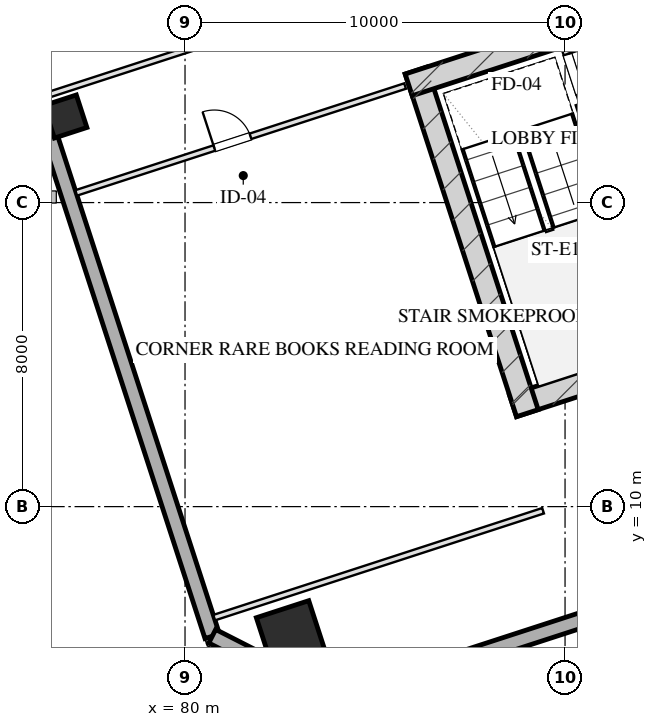
"""IFC4 building model, lengths in metres.
Left out: names, types, materials, properties, quantities, classifications, styles, units other than length and angle.
Written with IfcOpenShell. Run it as: python <this file> out.ifc"""

import sys

from ifc_helpers import new_model, si_unit, direction, frame, frame_2d, origin, origin_2d, place, context, subcontext, project, spatial, rectangle, hollow_rectangle, extrude, element, fill, save


model = new_model("IFC4")
c1 = context("Model", 3, precision=1e-05, world=origin(), true_north=direction((0.0, 1.0)))
c2 = subcontext(c1, "Body", "Model", "MODEL_VIEW")
j1 = project(units=[si_unit("LENGTHUNIT", "METRE"), si_unit("PLANEANGLEUNIT", "RADIAN")], contexts=[c1])
p1 = place(None, origin())
s1 = spatial("IfcSite", under=j1, at=p1, CompositionType="ELEMENT")
p2 = place(p1, origin())
s2 = spatial("IfcBuilding", under=s1, at=p2, CompositionType="ELEMENT")
p3 = place(p2, frame((0.0, 0.0, 100.05)))
s3 = spatial("IfcBuildingStorey", under=s2, at=p3, CompositionType="ELEMENT", Elevation=100.05)
p4 = place(p3, frame((88.63, 12.652, 0.0), z_axis=(0.0, 0.0, 1.0), x_axis=(0.95105714907, 0.309015046886, 0.0)))
e1 = element("IfcWall", 1, at=p4, inside=s3, PredefinedType="SHEAR", context=c2, shape_type="SweptSolid", body=[
    extrude(rectangle(XDim=16.4, YDim=0.6, at=frame_2d((8.2, 0.0))), origin(), (0.0, 0.0, 1.0), 3.45),
])
p5 = place(p3, frame((86.078, 21.475, 0.0), z_axis=(0.0, 0.0, 1.0), x_axis=(0.309017938678, -0.951056209472, 0.0)))
e2 = element("IfcWall", 2, at=p5, inside=s3, PredefinedType="SHEAR", context=c2, shape_type="SweptSolid", body=[
    extrude(rectangle(XDim=9.48, YDim=0.6, at=frame_2d((4.74, 0.0))), origin(), (0.0, 0.0, 1.0), 3.45),
])
p6 = place(p3, frame((85.886, 21.097, 0.0), z_axis=(0.0, 0.0, 1.0), x_axis=(0.951068073652, 0.308981422225, 0.0)))
e3 = element("IfcWall", 3, at=p6, inside=s3, PredefinedType="SHEAR", context=c2, shape_type="SweptSolid", body=[
    extrude(rectangle(XDim=4.22, YDim=0.6, at=frame_2d((2.11, 0.0))), origin(), (0.0, 0.0, 1.0), 3.45),
])
p7 = place(p3, frame((82.791, 6.612, 0.0), z_axis=(0.0, 0.0, 1.0), x_axis=(0.951056516295, 0.309016994375, 0.0)))
e4 = element("IfcColumn", 4, at=p7, inside=s3, PredefinedType="COLUMN", context=c2, shape_type="SweptSolid", body=[
    extrude(hollow_rectangle(XDim=1.45, YDim=1.45, WallThickness=0.05, at=origin_2d()), origin(), (0.0, 0.0, 1.0), 3.451),
])
p8 = place(p3, frame((76.851, 20.264, 0.0), z_axis=(0.0, 0.0, 1.0), x_axis=(0.951056516295, 0.309016994375, 0.0)))
e5 = element("IfcColumn", 5, at=p8, inside=s3, PredefinedType="COLUMN", context=c2, shape_type="SweptSolid", body=[
    extrude(hollow_rectangle(XDim=0.9, YDim=0.9, WallThickness=0.032, at=origin_2d()), origin(), (0.0, 0.0, 1.0), 3.451),
])
p9 = place(p3, frame((80.716, 6.59, 0.0), z_axis=(0.0, 0.0, 1.0), x_axis=(-0.309017542002, 0.95105633836, 0.0)))
e6 = element("IfcWall", 6, at=p9, inside=s3, PredefinedType="SOLIDWALL", context=c2, shape_type="SweptSolid", body=[
    extrude(rectangle(XDim=46.4, YDim=0.4, at=frame_2d((23.2, 0.0))), origin(), (0.0, 0.0, 1.0), 2.55),
])
p10 = place(p9, frame((15.6, 0.0, 0.75)))
e7 = element("IfcOpeningElement", 7, at=p10, cuts=e6, PredefinedType="OPENING", context=c2, shape_type="SweptSolid", body=[
    extrude(rectangle(XDim=2.4, YDim=1.4, at=frame_2d((1.2, 0.7))), frame((0.0, 0.21, 0.0), z_axis=(0.0, -1.0, 0.0), x_axis=(1.0, 0.0, 0.0)), (0.0, 0.0, 1.0), 0.42),
])
p11 = place(p9, frame((19.4, 0.0, 0.75)))
e8 = element("IfcOpeningElement", 8, at=p11, cuts=e6, PredefinedType="OPENING", context=c2, shape_type="SweptSolid", body=[
    extrude(rectangle(XDim=2.4, YDim=1.4, at=frame_2d((1.2, 0.7))), frame((0.0, 0.21, 0.0), z_axis=(0.0, -1.0, 0.0), x_axis=(1.0, 0.0, 0.0)), (0.0, 0.0, 1.0), 0.42),
])
p12 = place(p9, frame((25.496, 0.0, 0.0)))
e9 = element("IfcOpeningElement", 9, at=p12, cuts=e6, PredefinedType="OPENING", context=c2, shape_type="SweptSolid", body=[
    extrude(rectangle(XDim=1.1, YDim=2.15, at=frame_2d((0.55, 1.075))), frame((0.0, 0.21, 0.0), z_axis=(0.0, -1.0, 0.0), x_axis=(1.0, 0.0, 0.0)), (0.0, 0.0, 1.0), 0.42),
])
p13 = place(p3, frame((111.953, 14.005, 0.0), z_axis=(0.0, 0.0, 1.0), x_axis=(-0.95105505922, -0.309021478754, 0.0)))
e10 = element("IfcWall", 10, at=p13, inside=s3, PredefinedType="SOLIDWALL", context=c2, shape_type="SweptSolid", body=[
    extrude(rectangle(XDim=29.4, YDim=0.4, at=frame_2d((14.7, 0.0))), origin(), (0.0, 0.0, 1.0), 2.55),
])
p14 = place(p3, frame((83.992, 4.92, 0.0), z_axis=(0.0, 0.0, 1.0), x_axis=(-0.891001999643, 0.45399937955, 0.0)))
e11 = element("IfcWall", 11, at=p14, inside=s3, PredefinedType="SOLIDWALL", context=c2, shape_type="SweptSolid", body=[
    extrude(rectangle(XDim=3.677, YDim=0.4, at=frame_2d((1.839, 0.0))), origin(), (0.0, 0.0, 1.0), 2.55),
])
p15 = place(p3, frame((89.899, 22.401, 0.0), z_axis=(0.0, 0.0, 1.0), x_axis=(0.308932062672, -0.951084108086, 0.0)))
e12 = element("IfcWall", 12, at=p15, inside=s3, PredefinedType="PARTITIONING", context=c2, shape_type="SweptSolid", body=[
    extrude(rectangle(XDim=1.9, YDim=0.2, at=frame_2d((0.95, 0.0))), origin(), (0.0, 0.0, 1.0), 3.155),
])
p16 = place(p15, frame((0.52, 0.0, 0.0)))
e13 = element("IfcOpeningElement", 13, at=p16, cuts=e12, PredefinedType="OPENING", context=c2, shape_type="SweptSolid", body=[
    extrude(rectangle(XDim=1.1, YDim=2.05, at=frame_2d((0.55, 1.025))), frame((0.0, 0.11, 0.0), z_axis=(0.0, -1.0, 0.0), x_axis=(1.0, 0.0, 0.0)), (0.0, 0.0, 1.0), 0.22),
])
p17 = place(p3, frame((80.767, 7.079, 0.0), z_axis=(0.0, 0.0, 1.0), x_axis=(0.951057133767, 0.309015093986, 0.0)))
e14 = element("IfcWall", 14, at=p17, inside=s3, PredefinedType="PARTITIONING", context=c2, shape_type="SweptSolid", body=[
    extrude(rectangle(XDim=9.1, YDim=0.15, at=frame_2d((4.55, 0.0))), origin(), (0.0, 0.0, 1.0), 3.155),
])
p18 = place(p3, frame((77.136, 18.254, 0.0), z_axis=(0.0, 0.0, 1.0), x_axis=(0.951057133767, 0.309015093986, 0.0)))
e15 = element("IfcWall", 15, at=p18, inside=s3, PredefinedType="PARTITIONING", context=c2, shape_type="SweptSolid", body=[
    extrude(rectangle(XDim=9.1, YDim=0.15, at=frame_2d((4.55, 0.0))), origin(), (0.0, 0.0, 1.0), 3.155),
])
p19 = place(p18, frame((3.822, 0.0, 0.0)))
e16 = element("IfcOpeningElement", 16, at=p19, cuts=e15, PredefinedType="OPENING", context=c2, shape_type="SweptSolid", body=[
    extrude(rectangle(XDim=1.0, YDim=2.05, at=frame_2d((0.5, 1.025))), frame((0.0, 0.085, 0.0), z_axis=(0.0, -1.0, 0.0), x_axis=(1.0, 0.0, 0.0)), (0.0, 0.0, 1.0), 0.17),
])
p20 = place(p3, frame((76.308, 20.803, 0.0), z_axis=(0.0, 0.0, 1.0), x_axis=(0.95105437725, 0.3090235776, 0.0)))
e17 = element("IfcWall", 17, at=p20, inside=s3, PredefinedType="PARTITIONING", context=c2, shape_type="SweptSolid", body=[
    extrude(rectangle(XDim=7.95, YDim=0.15, at=frame_2d((3.975, 0.0))), origin(), (0.0, 0.0, 1.0), 3.155),
])
p21 = place(p16, origin())
e18 = element("IfcDoor", 18, at=p21, inside=s3, OperationType="SINGLE_SWING_LEFT", PredefinedType="DOOR", context=c2, shape_type="SweptSolid", body=[
    extrude(rectangle(XDim=1.1, YDim=2.05, at=frame_2d((0.55, 1.025))), frame((0.0, 0.025, 0.0), z_axis=(0.0, -1.0, 0.0), x_axis=(1.0, 0.0, 0.0)), (0.0, 0.0, 1.0), 0.05),
])
fill(e13, e18)
p22 = place(p19, origin())
e19 = element("IfcDoor", 19, at=p22, inside=s3, OperationType="SINGLE_SWING_LEFT", PredefinedType="DOOR", context=c2, shape_type="SweptSolid", body=[
    extrude(rectangle(XDim=1.0, YDim=2.05, at=frame_2d((0.5, 1.025))), frame((0.0, 0.025, 0.0), z_axis=(0.0, -1.0, 0.0), x_axis=(1.0, 0.0, 0.0)), (0.0, 0.0, 1.0), 0.05),
])
fill(e16, e19)
save(model, sys.argv[1])
